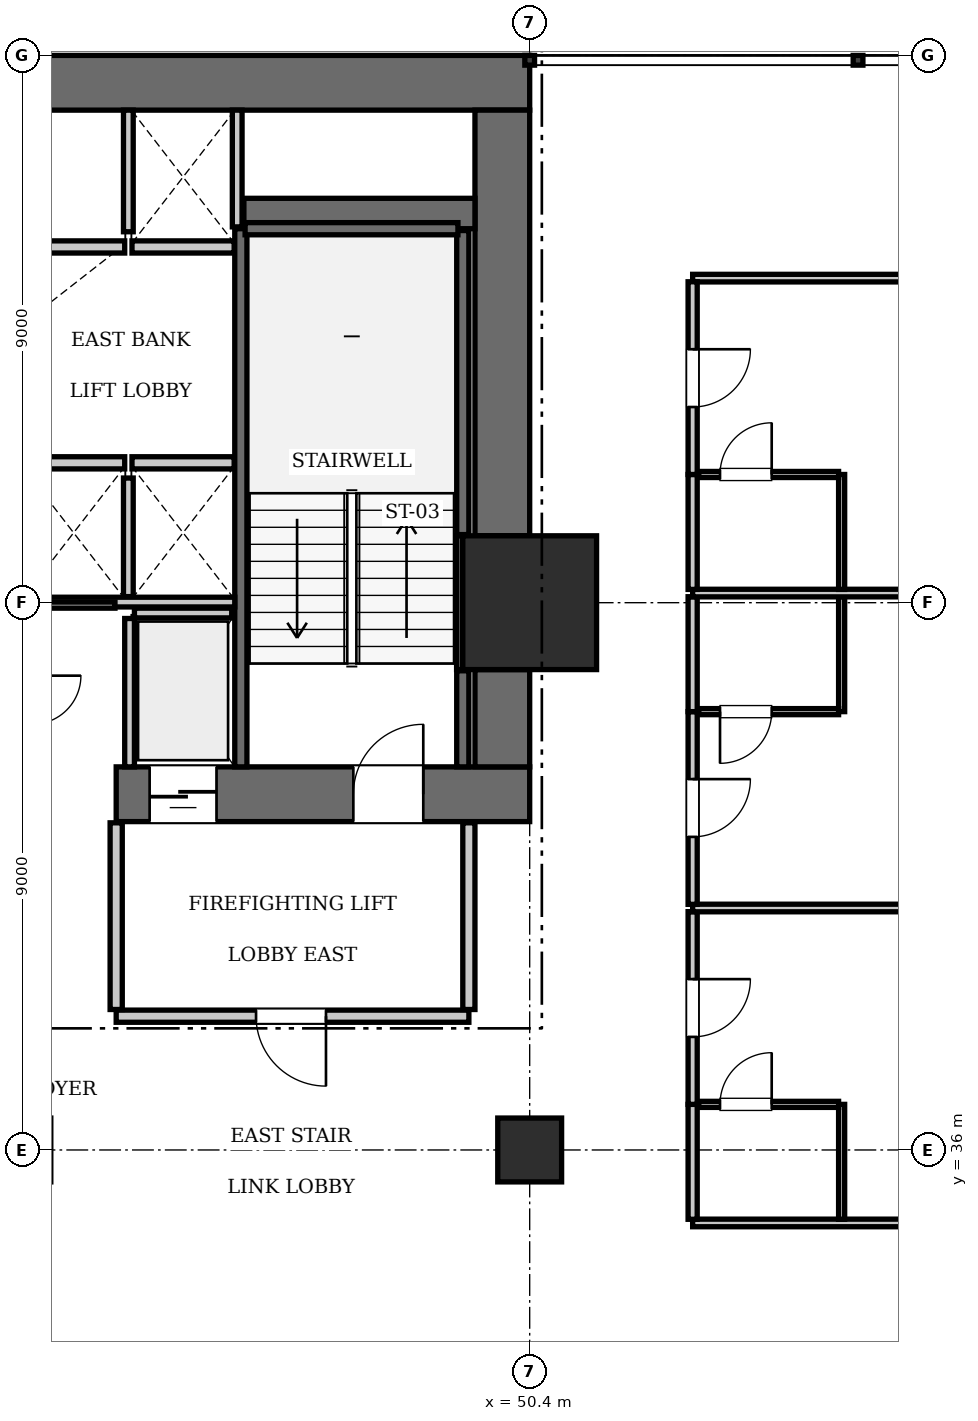
"""IFC4 building model, lengths in metres.
Left out: names, types, materials, properties, quantities, classifications, styles, units other than length and angle.
Written with IfcOpenShell. Run it as: python <this file> out.ifc"""

import sys

from ifc_helpers import new_model, si_unit, direction, frame, frame_2d, origin, origin_2d, place, context, subcontext, project, spatial, rectangle, extrude, element, fill, save


model = new_model("IFC4")
c1 = context("Model", 3, precision=1e-05, world=origin(), true_north=direction((0.0, 1.0)))
c2 = subcontext(c1, "Body", "Model", "MODEL_VIEW")
j1 = project(units=[si_unit("LENGTHUNIT", "METRE"), si_unit("PLANEANGLEUNIT", "RADIAN")], contexts=[c1])
p1 = place(None, origin())
s1 = spatial("IfcSite", under=j1, at=p1, CompositionType="ELEMENT")
p2 = place(p1, origin())
s2 = spatial("IfcBuilding", under=s1, at=p2, CompositionType="ELEMENT")
p3 = place(p2, frame((0.0, 0.0, 84.7)))
s3 = spatial("IfcBuildingStorey", under=s2, at=p3, CompositionType="ELEMENT", Elevation=84.7)
p4 = place(p3, frame((50.4, 45.0, 0.0), z_axis=(0.0, 0.0, 1.0), x_axis=(1.0, 0.0, 0.0)))
e1 = element("IfcColumn", 1, at=p4, inside=s3, PredefinedType="COLUMN", context=c2, shape_type="SweptSolid", body=[
    extrude(rectangle(XDim=2.2, YDim=2.2, at=origin_2d()), origin(), (0.0, 0.0, 1.0), 3.85),
])
p5 = place(p3, frame((25.2, 53.55, 0.0), z_axis=(0.0, 0.0, 1.0), x_axis=(1.0, 0.0, 0.0)))
e2 = element("IfcWall", 2, at=p5, inside=s3, PredefinedType="SHEAR", context=c2, shape_type="SweptSolid", body=[
    extrude(rectangle(XDim=25.2, YDim=0.9, at=frame_2d((12.6, 0.0))), origin(), (0.0, 0.0, 1.0), 3.85),
])
p6 = place(p3, frame((43.6, 41.85, 0.0), z_axis=(0.0, 0.0, 1.0), x_axis=(1.0, 0.0, 0.0)))
e3 = element("IfcWall", 3, at=p6, inside=s3, PredefinedType="SHEAR", context=c2, shape_type="SweptSolid", body=[
    extrude(rectangle(XDim=6.8, YDim=0.9, at=frame_2d((3.4, 0.0))), origin(), (0.0, 0.0, 1.0), 3.85),
])
p7 = place(p6, frame((3.9, 0.0, 0.0)))
e4 = element("IfcOpeningElement", 4, at=p7, cuts=e3, PredefinedType="OPENING", context=c2, shape_type="SweptSolid", body=[
    extrude(rectangle(XDim=1.15, YDim=2.15, at=frame_2d((0.575, 1.075))), frame((0.0, 0.46, 0.0), z_axis=(0.0, -1.0, 0.0), x_axis=(1.0, 0.0, 0.0)), (0.0, 0.0, 1.0), 0.92),
])
p8 = place(p6, frame((0.55, 0.0, 0.0)))
e5 = element("IfcOpeningElement", 5, at=p8, cuts=e3, PredefinedType="OPENING", context=c2, shape_type="SweptSolid", body=[
    extrude(rectangle(XDim=1.1, YDim=2.2, at=frame_2d((0.55, 1.1))), frame((0.0, 0.46, 0.0), z_axis=(0.0, -1.0, 0.0), x_axis=(1.0, 0.0, 0.0)), (0.0, 0.0, 1.0), 0.92),
])
p9 = place(p3, frame((49.95, 42.3, 0.0), z_axis=(0.0, 0.0, 1.0), x_axis=(0.0, 1.0, 0.0)))
e6 = element("IfcWall", 6, at=p9, inside=s3, PredefinedType="SHEAR", context=c2, shape_type="SweptSolid", body=[
    extrude(rectangle(XDim=1.6, YDim=0.9, at=frame_2d((0.8, 0.0))), origin(), (0.0, 0.0, 1.0), 3.85),
])
p10 = place(p3, frame((49.95, 46.1, 0.0), z_axis=(0.0, 0.0, 1.0), x_axis=(0.0, 1.0, 0.0)))
e7 = element("IfcWall", 7, at=p10, inside=s3, PredefinedType="SHEAR", context=c2, shape_type="SweptSolid", body=[
    extrude(rectangle(XDim=7.0, YDim=0.9, at=frame_2d((3.5, 0.0))), origin(), (0.0, 0.0, 1.0), 3.85),
])
p11 = place(p3, frame((45.7, 51.4, 0.0), z_axis=(0.0, 0.0, 1.0), x_axis=(1.0, 0.0, 0.0)))
e8 = element("IfcWall", 8, at=p11, inside=s3, PredefinedType="SHEAR", context=c2, shape_type="SweptSolid", body=[
    extrude(rectangle(XDim=3.8, YDim=0.5, at=frame_2d((1.9, 0.0))), origin(), (0.0, 0.0, 1.0), 3.85),
])
p12 = place(p3, frame((50.4, 36.0, 0.0), z_axis=(0.0, 0.0, 1.0), x_axis=(1.0, 0.0, 0.0)))
e9 = element("IfcColumn", 9, at=p12, inside=s3, PredefinedType="COLUMN", context=c2, shape_type="SweptSolid", body=[
    extrude(rectangle(XDim=1.05, YDim=1.05, at=origin_2d()), origin(), (0.0, 0.0, 1.0), 3.85),
])
p13 = place(p3, frame((45.65, 42.3, 0.0), z_axis=(0.0, 0.0, 1.0), x_axis=(0.0, 1.0, 0.0)))
e10 = element("IfcWall", 10, at=p13, inside=s3, PredefinedType="SOLIDWALL", context=c2, shape_type="SweptSolid", body=[
    extrude(rectangle(XDim=8.85, YDim=0.2, at=frame_2d((4.425, 0.0))), origin(), (0.0, 0.0, 1.0), 3.61),
])
p14 = place(p3, frame((49.3, 42.3, 0.0), z_axis=(0.0, 0.0, 1.0), x_axis=(0.0, 1.0, 0.0)))
e11 = element("IfcWall", 11, at=p14, inside=s3, PredefinedType="SOLIDWALL", context=c2, shape_type="SweptSolid", body=[
    extrude(rectangle(XDim=1.58, YDim=0.2, at=frame_2d((0.79, 0.0))), origin(), (0.0, 0.0, 1.0), 3.61),
])
p15 = place(p3, frame((49.3, 46.12, 0.0), z_axis=(0.0, 0.0, 1.0), x_axis=(0.0, 1.0, 0.0)))
e12 = element("IfcWall", 12, at=p15, inside=s3, PredefinedType="SOLIDWALL", context=c2, shape_type="SweptSolid", body=[
    extrude(rectangle(XDim=5.0, YDim=0.2, at=frame_2d((2.5, 0.0))), origin(), (0.0, 0.0, 1.0), 3.61),
])
p16 = place(p3, frame((45.72, 51.15, 0.0), z_axis=(0.0, 0.0, 1.0), x_axis=(1.0, 0.0, 0.0)))
e13 = element("IfcWall", 13, at=p16, inside=s3, PredefinedType="SOLIDWALL", context=c2, shape_type="SweptSolid", body=[
    extrude(rectangle(XDim=3.5, YDim=0.2, at=frame_2d((1.75, 0.0))), origin(), (0.0, 0.0, 1.0), 3.61),
])
p17 = place(p3, frame((49.248, 43.9, 0.0), z_axis=(0.0, 0.0, 1.0), x_axis=(0.0, 1.0, 0.0)))
e14 = element("IfcWall", 14, at=p17, inside=s3, PredefinedType="SOLIDWALL", context=c2, shape_type="SweptSolid", body=[
    extrude(rectangle(XDim=2.2, YDim=0.1, at=frame_2d((1.1, 0.0))), origin(), (0.0, 0.0, 1.0), 3.61),
])
for number, where, z_axis, x_axis in (
    (15, (42.06, 47.3, 0.0), (0.0, 0.0, 1.0), (1.0, 0.0, 0.0)),
    (16, (43.86, 47.3, 0.0), (0.0, 0.0, 1.0), (1.0, 0.0, 0.0)),
):
    element("IfcWall", number, at=place(p3, frame(where, z_axis=z_axis, x_axis=x_axis)), inside=s3, PredefinedType="SOLIDWALL", context=c2, shape_type="SweptSolid", body=[
        extrude(rectangle(XDim=1.68, YDim=0.2, at=frame_2d((0.84, 0.0))), origin(), (0.0, 0.0, 1.0), 3.61),
    ])
p18 = place(p3, frame((42.36, 50.85, 0.0), z_axis=(0.0, 0.0, 1.0), x_axis=(1.0, 0.0, 0.0)))
e17 = element("IfcWall", 17, at=p18, inside=s3, PredefinedType="SOLIDWALL", context=c2, shape_type="SweptSolid", body=[
    extrude(rectangle(XDim=1.38, YDim=0.2, at=frame_2d((0.69, 0.0))), origin(), (0.0, 0.0, 1.0), 3.61),
])
p19 = place(p3, frame((43.86, 50.85, 0.0), z_axis=(0.0, 0.0, 1.0), x_axis=(1.0, 0.0, 0.0)))
e18 = element("IfcWall", 18, at=p19, inside=s3, PredefinedType="SOLIDWALL", context=c2, shape_type="SweptSolid", body=[
    extrude(rectangle(XDim=1.68, YDim=0.2, at=frame_2d((0.84, 0.0))), origin(), (0.0, 0.0, 1.0), 3.61),
])
p20 = place(p3, frame((43.9, 44.83, 0.0), z_axis=(0.0, 0.0, 1.0), x_axis=(1.0, 0.0, 0.0)))
e19 = element("IfcWall", 19, at=p20, inside=s3, PredefinedType="SOLIDWALL", context=c2, shape_type="SweptSolid", body=[
    extrude(rectangle(XDim=1.6, YDim=0.16, at=frame_2d((0.8, 0.0))), origin(), (0.0, 0.0, 1.0), 3.61),
])
p21 = place(p3, frame((43.82, 42.3, 0.0), z_axis=(0.0, 0.0, 1.0), x_axis=(0.0, 1.0, 0.0)))
e20 = element("IfcWall", 20, at=p21, inside=s3, PredefinedType="SOLIDWALL", context=c2, shape_type="SweptSolid", body=[
    extrude(rectangle(XDim=2.44, YDim=0.16, at=frame_2d((1.22, 0.0))), origin(), (0.0, 0.0, 1.0), 3.61),
])
p22 = place(p3, frame((43.8, 45.1, 0.0), z_axis=(0.0, 0.0, 1.0), x_axis=(0.0, 1.0, 0.0)))
e21 = element("IfcWall", 21, at=p22, inside=s3, PredefinedType="SOLIDWALL", context=c2, shape_type="SweptSolid", body=[
    extrude(rectangle(XDim=1.95, YDim=0.16, at=frame_2d((0.975, 0.0))), origin(), (0.0, 0.0, 1.0), 3.61),
])
p23 = place(p3, frame((42.1, 45.01, 0.0), z_axis=(0.0, 0.0, 1.0), x_axis=(1.0, 0.0, 0.0)))
e22 = element("IfcWall", 22, at=p23, inside=s3, PredefinedType="SOLIDWALL", context=c2, shape_type="SweptSolid", body=[
    extrude(rectangle(XDim=3.45, YDim=0.16, at=frame_2d((1.725, 0.0))), origin(), (0.0, 0.0, 1.0), 3.61),
])
p24 = place(p3, frame((45.59, 51.18, 0.0), z_axis=(0.0, 0.0, 1.0), x_axis=(0.0, 1.0, 0.0)))
e23 = element("IfcWall", 23, at=p24, inside=s3, PredefinedType="SOLIDWALL", context=c2, shape_type="SweptSolid", body=[
    extrude(rectangle(XDim=1.92, YDim=0.16, at=frame_2d((0.96, 0.0))), origin(), (0.0, 0.0, 1.0), 3.61),
])
p25 = place(p3, frame((43.8, 51.1, 0.0), z_axis=(0.0, 0.0, 1.0), x_axis=(0.0, 1.0, 0.0)))
e24 = element("IfcWall", 24, at=p25, inside=s3, PredefinedType="SOLIDWALL", context=c2, shape_type="SweptSolid", body=[
    extrude(rectangle(XDim=2.0, YDim=0.16, at=frame_2d((1.0, 0.0))), origin(), (0.0, 0.0, 1.0), 3.61),
])
p26 = place(p3, frame((43.6, 38.2, 0.0), z_axis=(0.0, 0.0, 1.0), x_axis=(1.0, 0.0, 0.0)))
e25 = element("IfcWall", 25, at=p26, inside=s3, PredefinedType="PARTITIONING", context=c2, shape_type="SweptSolid", body=[
    extrude(rectangle(XDim=5.8, YDim=0.2, at=frame_2d((2.9, 0.0))), origin(), (0.0, 0.0, 1.0), 3.61),
])
p27 = place(p26, frame((2.3, 0.0, 0.0)))
e26 = element("IfcOpeningElement", 26, at=p27, cuts=e25, PredefinedType="OPENING", context=c2, shape_type="SweptSolid", body=[
    extrude(rectangle(XDim=1.15, YDim=2.15, at=frame_2d((0.575, 1.075))), frame((0.0, 0.11, 0.0), z_axis=(0.0, -1.0, 0.0), x_axis=(1.0, 0.0, 0.0)), (0.0, 0.0, 1.0), 0.22),
])
for number, where, z_axis, x_axis in (
    (27, (43.6, 38.31, 0.0), (0.0, 0.0, 1.0), (0.0, 1.0, 0.0)),
    (28, (49.4, 38.31, 0.0), (0.0, 0.0, 1.0), (0.0, 1.0, 0.0)),
):
    element("IfcWall", number, at=place(p3, frame(where, z_axis=z_axis, x_axis=x_axis)), inside=s3, PredefinedType="PARTITIONING", context=c2, shape_type="SweptSolid", body=[
        extrude(rectangle(XDim=3.07, YDim=0.2, at=frame_2d((1.535, 0.0))), origin(), (0.0, 0.0, 1.0), 3.61),
    ])
p28 = place(p3, frame((42.28, 44.96, 0.0), z_axis=(0.0, 0.0, 1.0), x_axis=(1.0, 0.0, 0.0)))
e29 = element("IfcWall", 29, at=p28, inside=s3, PredefinedType="PARTITIONING", context=c2, shape_type="SweptSolid", body=[
    extrude(rectangle(XDim=1.3, YDim=0.1, at=frame_2d((0.65, 0.0))), origin(), (0.0, 0.0, 1.0), 3.61),
])
p29 = place(p3, frame((53.08, 34.8, 0.0), z_axis=(0.0, 0.0, 1.0), x_axis=(1.0, 0.0, 0.0)))
e30 = element("IfcWall", 30, at=p29, inside=s3, PredefinedType="PARTITIONING", context=c2, shape_type="SweptSolid", body=[
    extrude(rectangle(XDim=11.62, YDim=0.125, at=frame_2d((5.81, 0.0))), origin(), (0.0, 0.0, 1.0), 3.61),
])
p30 = place(p3, frame((53.08, 50.337, 0.0), z_axis=(0.0, 0.0, 1.0), x_axis=(1.0, 0.0, 0.0)))
e31 = element("IfcWall", 31, at=p30, inside=s3, PredefinedType="PARTITIONING", context=c2, shape_type="SweptSolid", body=[
    extrude(rectangle(XDim=8.38, YDim=0.125, at=frame_2d((4.19, 0.0))), origin(), (0.0, 0.0, 1.0), 3.61),
])
p31 = place(p3, frame((53.08, 34.86, 0.0), z_axis=(0.0, 0.0, 1.0), x_axis=(0.0, 1.0, 0.0)))
e32 = element("IfcWall", 32, at=p31, inside=s3, PredefinedType="PARTITIONING", context=c2, shape_type="SweptSolid", body=[
    extrude(rectangle(XDim=1.89, YDim=0.15, at=frame_2d((0.945, 0.0))), origin(), (0.0, 0.0, 1.0), 3.61),
])
p32 = place(p3, frame((53.08, 36.75, 0.0), z_axis=(0.0, 0.0, 1.0), x_axis=(0.0, 1.0, 0.0)))
e33 = element("IfcWall", 33, at=p32, inside=s3, PredefinedType="PARTITIONING", context=c2, shape_type="SweptSolid", body=[
    extrude(rectangle(XDim=3.169, YDim=0.15, at=frame_2d((1.584, 0.0))), origin(), (0.0, 0.0, 1.0), 3.61),
])
p33 = place(p32, frame((1.11, 0.0, 0.0)))
e34 = element("IfcOpeningElement", 34, at=p33, cuts=e33, PredefinedType="OPENING", context=c2, shape_type="SweptSolid", body=[
    extrude(rectangle(XDim=0.95, YDim=2.15, at=frame_2d((0.475, 1.075))), frame((0.0, 0.085, 0.0), z_axis=(0.0, -1.0, 0.0), x_axis=(1.0, 0.0, 0.0)), (0.0, 0.0, 1.0), 0.17),
])
p34 = place(p3, frame((55.53, 34.86, 0.0), z_axis=(0.0, 0.0, 1.0), x_axis=(0.0, 1.0, 0.0)))
e35 = element("IfcWall", 35, at=p34, inside=s3, PredefinedType="PARTITIONING", context=c2, shape_type="SweptSolid", body=[
    extrude(rectangle(XDim=1.89, YDim=0.1, at=frame_2d((0.945, 0.0))), origin(), (0.0, 0.0, 1.0), 3.61),
])
p35 = place(p3, frame((53.18, 36.75, 0.0), z_axis=(0.0, 0.0, 1.0), x_axis=(1.0, 0.0, 0.0)))
e36 = element("IfcWall", 36, at=p35, inside=s3, PredefinedType="PARTITIONING", context=c2, shape_type="SweptSolid", body=[
    extrude(rectangle(XDim=2.3, YDim=0.1, at=frame_2d((1.15, 0.0))), origin(), (0.0, 0.0, 1.0), 3.61),
])
p36 = place(p35, frame((0.35, 0.0, 0.0)))
e37 = element("IfcOpeningElement", 37, at=p36, cuts=e36, PredefinedType="OPENING", context=c2, shape_type="SweptSolid", body=[
    extrude(rectangle(XDim=0.85, YDim=2.1, at=frame_2d((0.425, 1.05))), frame((0.0, 0.06, 0.0), z_axis=(0.0, -1.0, 0.0), x_axis=(1.0, 0.0, 0.0)), (0.0, 0.0, 1.0), 0.12),
])
p37 = place(p3, frame((53.08, 39.979, 0.0), z_axis=(0.0, 0.0, 1.0), x_axis=(1.0, 0.0, 0.0)))
e38 = element("IfcWall", 38, at=p37, inside=s3, PredefinedType="PARTITIONING", context=c2, shape_type="SweptSolid", body=[
    extrude(rectangle(XDim=11.62, YDim=0.125, at=frame_2d((5.81, 0.0))), origin(), (0.0, 0.0, 1.0), 3.61),
])
p38 = place(p3, frame((53.08, 40.039, 0.0), z_axis=(0.0, 0.0, 1.0), x_axis=(0.0, 1.0, 0.0)))
e39 = element("IfcWall", 39, at=p38, inside=s3, PredefinedType="PARTITIONING", context=c2, shape_type="SweptSolid", body=[
    extrude(rectangle(XDim=3.169, YDim=0.15, at=frame_2d((1.584, 0.0))), origin(), (0.0, 0.0, 1.0), 3.61),
])
p39 = place(p38, frame((1.11, 0.0, 0.0)))
e40 = element("IfcOpeningElement", 40, at=p39, cuts=e39, PredefinedType="OPENING", context=c2, shape_type="SweptSolid", body=[
    extrude(rectangle(XDim=0.95, YDim=2.15, at=frame_2d((0.475, 1.075))), frame((0.0, 0.085, 0.0), z_axis=(0.0, -1.0, 0.0), x_axis=(1.0, 0.0, 0.0)), (0.0, 0.0, 1.0), 0.17),
])
p40 = place(p3, frame((53.08, 43.208, 0.0), z_axis=(0.0, 0.0, 1.0), x_axis=(0.0, 1.0, 0.0)))
e41 = element("IfcWall", 41, at=p40, inside=s3, PredefinedType="PARTITIONING", context=c2, shape_type="SweptSolid", body=[
    extrude(rectangle(XDim=1.89, YDim=0.15, at=frame_2d((0.945, 0.0))), origin(), (0.0, 0.0, 1.0), 3.61),
])
p41 = place(p3, frame((55.53, 43.208, 0.0), z_axis=(0.0, 0.0, 1.0), x_axis=(0.0, 1.0, 0.0)))
e42 = element("IfcWall", 42, at=p41, inside=s3, PredefinedType="PARTITIONING", context=c2, shape_type="SweptSolid", body=[
    extrude(rectangle(XDim=1.89, YDim=0.1, at=frame_2d((0.945, 0.0))), origin(), (0.0, 0.0, 1.0), 3.61),
])
p42 = place(p3, frame((53.18, 43.208, 0.0), z_axis=(0.0, 0.0, 1.0), x_axis=(1.0, 0.0, 0.0)))
e43 = element("IfcWall", 43, at=p42, inside=s3, PredefinedType="PARTITIONING", context=c2, shape_type="SweptSolid", body=[
    extrude(rectangle(XDim=2.3, YDim=0.1, at=frame_2d((1.15, 0.0))), origin(), (0.0, 0.0, 1.0), 3.61),
])
p43 = place(p42, frame((0.35, 0.0, 0.0)))
e44 = element("IfcOpeningElement", 44, at=p43, cuts=e43, PredefinedType="OPENING", context=c2, shape_type="SweptSolid", body=[
    extrude(rectangle(XDim=0.85, YDim=2.1, at=frame_2d((0.425, 1.05))), frame((0.0, 0.06, 0.0), z_axis=(0.0, -1.0, 0.0), x_axis=(1.0, 0.0, 0.0)), (0.0, 0.0, 1.0), 0.12),
])
p44 = place(p3, frame((53.08, 45.158, 0.0), z_axis=(0.0, 0.0, 1.0), x_axis=(1.0, 0.0, 0.0)))
e45 = element("IfcWall", 45, at=p44, inside=s3, PredefinedType="PARTITIONING", context=c2, shape_type="SweptSolid", body=[
    extrude(rectangle(XDim=11.62, YDim=0.125, at=frame_2d((5.81, 0.0))), origin(), (0.0, 0.0, 1.0), 2.999),
])
p45 = place(p3, frame((53.08, 45.218, 0.0), z_axis=(0.0, 0.0, 1.0), x_axis=(0.0, 1.0, 0.0)))
e46 = element("IfcWall", 46, at=p45, inside=s3, PredefinedType="PARTITIONING", context=c2, shape_type="SweptSolid", body=[
    extrude(rectangle(XDim=1.89, YDim=0.15, at=frame_2d((0.945, 0.0))), origin(), (0.0, 0.0, 1.0), 3.61),
])
p46 = place(p3, frame((53.08, 47.108, 0.0), z_axis=(0.0, 0.0, 1.0), x_axis=(0.0, 1.0, 0.0)))
e47 = element("IfcWall", 47, at=p46, inside=s3, PredefinedType="PARTITIONING", context=c2, shape_type="SweptSolid", body=[
    extrude(rectangle(XDim=3.169, YDim=0.15, at=frame_2d((1.584, 0.0))), origin(), (0.0, 0.0, 1.0), 3.61),
])
p47 = place(p46, frame((1.11, 0.0, 0.0)))
e48 = element("IfcOpeningElement", 48, at=p47, cuts=e47, PredefinedType="OPENING", context=c2, shape_type="SweptSolid", body=[
    extrude(rectangle(XDim=0.95, YDim=2.15, at=frame_2d((0.475, 1.075))), frame((0.0, 0.085, 0.0), z_axis=(0.0, -1.0, 0.0), x_axis=(1.0, 0.0, 0.0)), (0.0, 0.0, 1.0), 0.17),
])
p48 = place(p3, frame((55.53, 45.218, 0.0), z_axis=(0.0, 0.0, 1.0), x_axis=(0.0, 1.0, 0.0)))
e49 = element("IfcWall", 49, at=p48, inside=s3, PredefinedType="PARTITIONING", context=c2, shape_type="SweptSolid", body=[
    extrude(rectangle(XDim=1.89, YDim=0.1, at=frame_2d((0.945, 0.0))), origin(), (0.0, 0.0, 1.0), 3.61),
])
p49 = place(p3, frame((53.18, 47.108, 0.0), z_axis=(0.0, 0.0, 1.0), x_axis=(1.0, 0.0, 0.0)))
e50 = element("IfcWall", 50, at=p49, inside=s3, PredefinedType="PARTITIONING", context=c2, shape_type="SweptSolid", body=[
    extrude(rectangle(XDim=2.3, YDim=0.1, at=frame_2d((1.15, 0.0))), origin(), (0.0, 0.0, 1.0), 3.61),
])
p50 = place(p49, frame((0.35, 0.0, 0.0)))
e51 = element("IfcOpeningElement", 51, at=p50, cuts=e50, PredefinedType="OPENING", context=c2, shape_type="SweptSolid", body=[
    extrude(rectangle(XDim=0.85, YDim=2.1, at=frame_2d((0.425, 1.05))), frame((0.0, 0.06, 0.0), z_axis=(0.0, -1.0, 0.0), x_axis=(1.0, 0.0, 0.0)), (0.0, 0.0, 1.0), 0.12),
])
p51 = place(p7, origin())
e52 = element("IfcDoor", 52, at=p51, inside=s3, OperationType="SINGLE_SWING_RIGHT", PredefinedType="DOOR", context=c2, shape_type="SweptSolid", body=[
    extrude(rectangle(XDim=1.15, YDim=2.15, at=frame_2d((0.575, 1.075))), frame((0.0, 0.025, 0.0), z_axis=(0.0, -1.0, 0.0), x_axis=(1.0, 0.0, 0.0)), (0.0, 0.0, 1.0), 0.05),
])
fill(e4, e52)
p52 = place(p8, frame((1.1, 0.0, 0.0), z_axis=(0.0, 0.0, 1.0), x_axis=(-1.0, 0.0, 0.0)))
e53 = element("IfcDoor", 53, at=p52, inside=s3, OperationType="SLIDING_TO_LEFT", PredefinedType="DOOR", context=c2, shape_type="SweptSolid", body=[
    extrude(rectangle(XDim=1.1, YDim=2.2, at=frame_2d((0.55, 1.1))), frame((0.0, 0.025, 0.0), z_axis=(0.0, -1.0, 0.0), x_axis=(1.0, 0.0, 0.0)), (0.0, 0.0, 1.0), 0.05),
])
fill(e5, e53)
p53 = place(p27, frame((1.15, 0.0, 0.0), z_axis=(0.0, 0.0, 1.0), x_axis=(-1.0, 0.0, 0.0)))
e54 = element("IfcDoor", 54, at=p53, inside=s3, OperationType="SINGLE_SWING_LEFT", PredefinedType="DOOR", context=c2, shape_type="SweptSolid", body=[
    extrude(rectangle(XDim=1.15, YDim=2.15, at=frame_2d((0.575, 1.075))), frame((0.0, 0.025, 0.0), z_axis=(0.0, -1.0, 0.0), x_axis=(1.0, 0.0, 0.0)), (0.0, 0.0, 1.0), 0.05),
])
fill(e26, e54)
p54 = place(p36, origin())
e55 = element("IfcDoor", 55, at=p54, inside=s3, OperationType="SINGLE_SWING_RIGHT", PredefinedType="DOOR", context=c2, shape_type="SweptSolid", body=[
    extrude(rectangle(XDim=0.85, YDim=2.1, at=frame_2d((0.425, 1.05))), frame((0.0, 0.025, 0.0), z_axis=(0.0, -1.0, 0.0), x_axis=(1.0, 0.0, 0.0)), (0.0, 0.0, 1.0), 0.05),
])
fill(e37, e55)
p55 = place(p33, frame((0.95, 0.0, 0.0), z_axis=(0.0, 0.0, 1.0), x_axis=(-1.0, 0.0, 0.0)))
e56 = element("IfcDoor", 56, at=p55, inside=s3, OperationType="SINGLE_SWING_LEFT", PredefinedType="DOOR", context=c2, shape_type="SweptSolid", body=[
    extrude(rectangle(XDim=0.95, YDim=2.15, at=frame_2d((0.475, 1.075))), frame((0.0, 0.025, 0.0), z_axis=(0.0, -1.0, 0.0), x_axis=(1.0, 0.0, 0.0)), (0.0, 0.0, 1.0), 0.05),
])
fill(e34, e56)
p56 = place(p43, frame((0.85, 0.0, 0.0), z_axis=(0.0, 0.0, 1.0), x_axis=(-1.0, 0.0, 0.0)))
e57 = element("IfcDoor", 57, at=p56, inside=s3, OperationType="SINGLE_SWING_RIGHT", PredefinedType="DOOR", context=c2, shape_type="SweptSolid", body=[
    extrude(rectangle(XDim=0.85, YDim=2.1, at=frame_2d((0.425, 1.05))), frame((0.0, 0.025, 0.0), z_axis=(0.0, -1.0, 0.0), x_axis=(1.0, 0.0, 0.0)), (0.0, 0.0, 1.0), 0.05),
])
fill(e44, e57)
p57 = place(p39, frame((0.95, 0.0, 0.0), z_axis=(0.0, 0.0, 1.0), x_axis=(-1.0, 0.0, 0.0)))
e58 = element("IfcDoor", 58, at=p57, inside=s3, OperationType="SINGLE_SWING_LEFT", PredefinedType="DOOR", context=c2, shape_type="SweptSolid", body=[
    extrude(rectangle(XDim=0.95, YDim=2.15, at=frame_2d((0.475, 1.075))), frame((0.0, 0.025, 0.0), z_axis=(0.0, -1.0, 0.0), x_axis=(1.0, 0.0, 0.0)), (0.0, 0.0, 1.0), 0.05),
])
fill(e40, e58)
p58 = place(p50, origin())
e59 = element("IfcDoor", 59, at=p58, inside=s3, OperationType="SINGLE_SWING_RIGHT", PredefinedType="DOOR", context=c2, shape_type="SweptSolid", body=[
    extrude(rectangle(XDim=0.85, YDim=2.1, at=frame_2d((0.425, 1.05))), frame((0.0, 0.025, 0.0), z_axis=(0.0, -1.0, 0.0), x_axis=(1.0, 0.0, 0.0)), (0.0, 0.0, 1.0), 0.05),
])
fill(e51, e59)
p59 = place(p47, frame((0.95, 0.0, 0.0), z_axis=(0.0, 0.0, 1.0), x_axis=(-1.0, 0.0, 0.0)))
e60 = element("IfcDoor", 60, at=p59, inside=s3, OperationType="SINGLE_SWING_LEFT", PredefinedType="DOOR", context=c2, shape_type="SweptSolid", body=[
    extrude(rectangle(XDim=0.95, YDim=2.15, at=frame_2d((0.475, 1.075))), frame((0.0, 0.025, 0.0), z_axis=(0.0, -1.0, 0.0), x_axis=(1.0, 0.0, 0.0)), (0.0, 0.0, 1.0), 0.05),
])
fill(e48, e60)
save(model, sys.argv[1])
